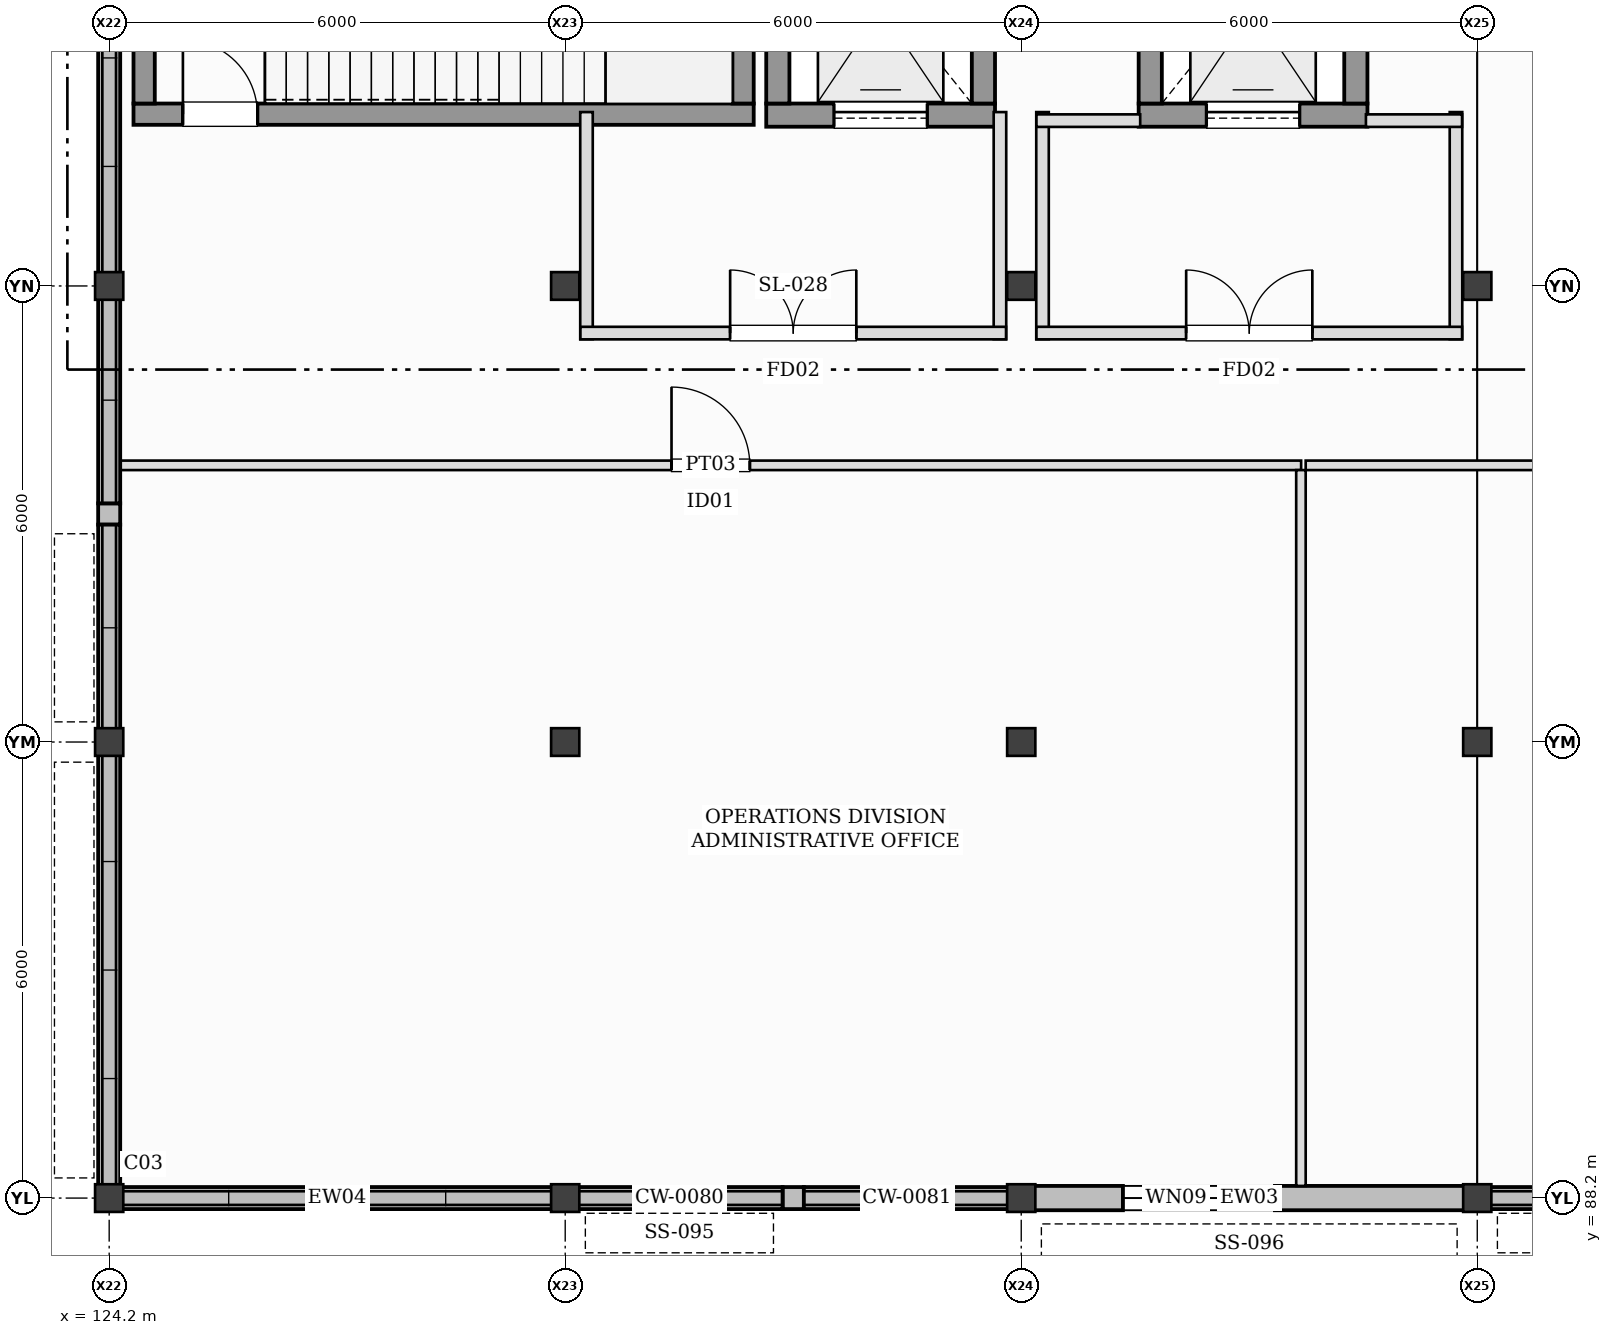
"""IFC4 building model, lengths in metres.
Left out: names, types, materials, properties, quantities, classifications, styles, units other than length and angle.
Written with IfcOpenShell. Run it as: python <this file> out.ifc"""

import sys

from ifc_helpers import new_model, si_unit, direction, frame, frame_2d, origin, origin_2d, place, context, subcontext, project, spatial, rectangle, i_section, extrude, element, fill, save


model = new_model("IFC4")
c1 = context("Model", 3, precision=1e-05, world=origin(), true_north=direction((0.0, 1.0)))
c2 = subcontext(c1, "Body", "Model", "MODEL_VIEW")
j1 = project(units=[si_unit("LENGTHUNIT", "METRE"), si_unit("PLANEANGLEUNIT", "RADIAN")], contexts=[c1])
p1 = place(None, origin())
s1 = spatial("IfcSite", under=j1, at=p1, CompositionType="ELEMENT")
p2 = place(p1, origin())
s2 = spatial("IfcBuilding", under=s1, at=p2, CompositionType="ELEMENT")
p3 = place(p2, frame((0.0, 0.0, 6.0)))
s3 = spatial("IfcBuildingStorey", under=s2, at=p3, CompositionType="ELEMENT", Elevation=6.0)
for number, where, z_axis, x_axis in (
    (1, (124.2, 88.2, 0.0), (0.0, 0.0, 1.0), (1.0, 0.0, 0.0)),
    (2, (124.2, 94.2, 0.0), (0.0, 0.0, 1.0), (1.0, 0.0, 0.0)),
    (3, (124.2, 100.2, 0.0), (0.0, 0.0, 1.0), (1.0, 0.0, 0.0)),
    (4, (130.2, 88.2, 0.0), (0.0, 0.0, 1.0), (1.0, 0.0, 0.0)),
    (5, (130.2, 94.2, 0.0), (0.0, 0.0, 1.0), (1.0, 0.0, 0.0)),
    (6, (130.2, 100.2, 0.0), (0.0, 0.0, 1.0), (1.0, 0.0, 0.0)),
    (7, (136.2, 88.2, 0.0), (0.0, 0.0, 1.0), (1.0, 0.0, 0.0)),
    (8, (136.2, 94.2, 0.0), (0.0, 0.0, 1.0), (1.0, 0.0, 0.0)),
    (9, (136.2, 100.2, 0.0), (0.0, 0.0, 1.0), (1.0, 0.0, 0.0)),
    (10, (142.2, 88.2, 0.0), (0.0, 0.0, 1.0), (1.0, 0.0, 0.0)),
    (11, (142.2, 94.2, 0.0), (0.0, 0.0, 1.0), (1.0, 0.0, 0.0)),
    (12, (142.2, 100.2, 0.0), (0.0, 0.0, 1.0), (1.0, 0.0, 0.0)),
):
    element("IfcColumn", number, at=place(p3, frame(where, z_axis=z_axis, x_axis=x_axis)), inside=s3, PredefinedType="COLUMN", context=c2, shape_type="SweptSolid", body=[
        extrude(i_section(OverallWidth=0.371, OverallDepth=0.364, WebThickness=0.013, FlangeThickness=0.022, at=origin_2d()), origin(), (0.0, 0.0, 1.0), 4.0),
    ])
p4 = place(p3, frame((124.345, 88.2, 0.0), z_axis=(0.0, 0.0, 1.0), x_axis=(1.0, 0.0, 0.0)))
e13 = element("IfcWall", 13, at=p4, inside=s3, PredefinedType="STANDARD", context=c2, shape_type="SweptSolid", body=[
    extrude(rectangle(XDim=5.71, YDim=0.29, at=frame_2d((2.855, 0.0))), origin(), (0.0, 0.0, 1.0), 0.68),
])
p5 = place(p3, frame((133.06, 88.2, 0.0), z_axis=(0.0, 0.0, 1.0), x_axis=(1.0, 0.0, 0.0)))
e14 = element("IfcWall", 14, at=p5, inside=s3, PredefinedType="STANDARD", context=c2, shape_type="SweptSolid", body=[
    extrude(rectangle(XDim=0.28, YDim=0.29, at=frame_2d((0.14, 0.0))), origin(), (0.0, 0.0, 1.0), 3.153),
])
p6 = place(p3, frame((130.345, 88.2, 0.0), z_axis=(0.0, 0.0, 1.0), x_axis=(1.0, 0.0, 0.0)))
e15 = element("IfcWall", 15, at=p6, inside=s3, PredefinedType="STANDARD", context=c2, shape_type="SweptSolid", body=[
    extrude(rectangle(XDim=2.715, YDim=0.29, at=frame_2d((1.357, 0.0))), origin(), (0.0, 0.0, 1.0), 0.8),
])
p7 = place(p3, frame((133.34, 88.2, 0.0), z_axis=(0.0, 0.0, 1.0), x_axis=(1.0, 0.0, 0.0)))
e16 = element("IfcWall", 16, at=p7, inside=s3, PredefinedType="STANDARD", context=c2, shape_type="SweptSolid", body=[
    extrude(rectangle(XDim=2.715, YDim=0.29, at=frame_2d((1.357, 0.0))), origin(), (0.0, 0.0, 1.0), 0.92),
])
p8 = place(p3, frame((136.345, 88.2, 0.0), z_axis=(0.0, 0.0, 1.0), x_axis=(1.0, 0.0, 0.0)))
e17 = element("IfcWall", 17, at=p8, inside=s3, PredefinedType="STANDARD", context=c2, shape_type="SweptSolid", body=[
    extrude(rectangle(XDim=5.71, YDim=0.32, at=frame_2d((2.855, 0.0))), origin(), (0.0, 0.0, 1.0), 3.153),
])
p9 = place(p8, frame((1.193, 0.0, 1.0)))
e18 = element("IfcOpeningElement", 18, at=p9, cuts=e17, PredefinedType="OPENING", context=c2, shape_type="SweptSolid", body=[
    extrude(rectangle(XDim=2.0, YDim=1.36, at=frame_2d((1.0, 0.68))), frame((0.0, 0.17, 0.0), z_axis=(0.0, -1.0, 0.0), x_axis=(1.0, 0.0, 0.0)), (0.0, 0.0, 1.0), 0.34),
])
p10 = place(p3, frame((142.345, 88.2, 0.0), z_axis=(0.0, 0.0, 1.0), x_axis=(1.0, 0.0, 0.0)))
e19 = element("IfcWall", 19, at=p10, inside=s3, PredefinedType="STANDARD", context=c2, shape_type="SweptSolid", body=[
    extrude(rectangle(XDim=2.715, YDim=0.29, at=frame_2d((1.357, 0.0))), origin(), (0.0, 0.0, 1.0), 0.32),
])
p11 = place(p3, frame((124.2, 94.055, 0.0), z_axis=(0.0, 0.0, 1.0), x_axis=(0.0, -1.0, 0.0)))
e20 = element("IfcWall", 20, at=p11, inside=s3, PredefinedType="STANDARD", context=c2, shape_type="SweptSolid", body=[
    extrude(rectangle(XDim=5.71, YDim=0.29, at=frame_2d((2.855, 0.0))), origin(), (0.0, 0.0, 1.0), 0.56),
])
p12 = place(p3, frame((124.2, 97.34, 0.0), z_axis=(0.0, 0.0, 1.0), x_axis=(0.0, -1.0, 0.0)))
e21 = element("IfcWall", 21, at=p12, inside=s3, PredefinedType="STANDARD", context=c2, shape_type="SweptSolid", body=[
    extrude(rectangle(XDim=0.28, YDim=0.29, at=frame_2d((0.14, 0.0))), origin(), (0.0, 0.0, 1.0), 3.157),
])
p13 = place(p3, frame((124.2, 100.055, 0.0), z_axis=(0.0, 0.0, 1.0), x_axis=(0.0, -1.0, 0.0)))
e22 = element("IfcWall", 22, at=p13, inside=s3, PredefinedType="STANDARD", context=c2, shape_type="SweptSolid", body=[
    extrude(rectangle(XDim=2.715, YDim=0.29, at=frame_2d((1.357, 0.0))), origin(), (0.0, 0.0, 1.0), 0.68),
])
p14 = place(p3, frame((124.2, 97.06, 0.0), z_axis=(0.0, 0.0, 1.0), x_axis=(0.0, -1.0, 0.0)))
e23 = element("IfcWall", 23, at=p14, inside=s3, PredefinedType="STANDARD", context=c2, shape_type="SweptSolid", body=[
    extrude(rectangle(XDim=2.715, YDim=0.29, at=frame_2d((1.357, 0.0))), origin(), (0.0, 0.0, 1.0), 0.8),
])
p15 = place(p3, frame((124.2, 106.055, 0.0), z_axis=(0.0, 0.0, 1.0), x_axis=(0.0, -1.0, 0.0)))
e24 = element("IfcWall", 24, at=p15, inside=s3, PredefinedType="STANDARD", context=c2, shape_type="SweptSolid", body=[
    extrude(rectangle(XDim=5.71, YDim=0.29, at=frame_2d((2.855, 0.0))), origin(), (0.0, 0.0, 1.0), 0.92),
])
p16 = place(p3, frame((124.52, 102.46, 0.0), z_axis=(0.0, 0.0, 1.0), x_axis=(1.0, 0.0, 0.0)))
e25 = element("IfcWall", 25, at=p16, inside=s3, PredefinedType="SHEAR", context=c2, shape_type="SweptSolid", body=[
    extrude(rectangle(XDim=8.16, YDim=0.28, at=frame_2d((4.08, 0.0))), origin(), (0.0, 0.0, 1.0), 4.0),
])
p17 = place(p16, frame((0.65, 0.0, 0.0)))
e26 = element("IfcOpeningElement", 26, at=p17, cuts=e25, PredefinedType="OPENING", context=c2, shape_type="SweptSolid", body=[
    extrude(rectangle(XDim=0.98, YDim=2.15, at=frame_2d((0.49, 1.075))), frame((0.0, 0.15, 0.0), z_axis=(0.0, -1.0, 0.0), x_axis=(1.0, 0.0, 0.0)), (0.0, 0.0, 1.0), 0.3),
])
for number, where, z_axis, x_axis in (
    (27, (124.66, 105.6, 0.0), (0.0, 0.0, 1.0), (0.0, -1.0, 0.0)),
    (28, (132.54, 102.6, 0.0), (0.0, 0.0, 1.0), (0.0, 1.0, 0.0)),
):
    element("IfcWall", number, at=place(p3, frame(where, z_axis=z_axis, x_axis=x_axis)), inside=s3, PredefinedType="SHEAR", context=c2, shape_type="SweptSolid", body=[
        extrude(rectangle(XDim=3.0, YDim=0.28, at=frame_2d((1.5, 0.0))), origin(), (0.0, 0.0, 1.0), 4.0),
    ])
p18 = place(p3, frame((132.845, 102.448, 0.0), z_axis=(0.0, 0.0, 1.0), x_axis=(1.0, 0.0, 0.0)))
e29 = element("IfcWall", 29, at=p18, inside=s3, PredefinedType="SHEAR", context=c2, shape_type="SweptSolid", body=[
    extrude(rectangle(XDim=3.01, YDim=0.305, at=frame_2d((1.505, 0.0))), origin(), (0.0, 0.0, 1.0), 4.0),
])
p19 = place(p18, frame((0.895, 0.0, 0.0)))
e30 = element("IfcOpeningElement", 30, at=p19, cuts=e29, PredefinedType="OPENING", context=c2, shape_type="SweptSolid", body=[
    extrude(rectangle(XDim=1.22, YDim=2.22, at=frame_2d((0.61, 1.11))), frame((0.0, 0.162, 0.0), z_axis=(0.0, -1.0, 0.0), x_axis=(1.0, 0.0, 0.0)), (0.0, 0.0, 1.0), 0.325),
])
for number, where, z_axis, x_axis in (
    (31, (132.998, 105.6, 0.0), (0.0, 0.0, 1.0), (0.0, -1.0, 0.0)),
    (32, (135.702, 102.6, 0.0), (0.0, 0.0, 1.0), (0.0, 1.0, 0.0)),
):
    element("IfcWall", number, at=place(p3, frame(where, z_axis=z_axis, x_axis=x_axis)), inside=s3, PredefinedType="SHEAR", context=c2, shape_type="SweptSolid", body=[
        extrude(rectangle(XDim=3.0, YDim=0.305, at=frame_2d((1.5, 0.0))), origin(), (0.0, 0.0, 1.0), 4.0),
    ])
for number, where, z_axis, x_axis in (
    (33, (130.48, 99.5, 0.0), (0.0, 0.0, 1.0), (0.0, 1.0, 0.0)),
    (34, (135.92, 102.488, 0.0), (0.0, 0.0, 1.0), (0.0, -1.0, 0.0)),
):
    element("IfcWall", number, at=place(p3, frame(where, z_axis=z_axis, x_axis=x_axis)), inside=s3, PredefinedType="PARTITIONING", context=c2, shape_type="SweptSolid", body=[
        extrude(rectangle(XDim=2.988, YDim=0.165, at=frame_2d((1.494, 0.0))), origin(), (0.0, 0.0, 1.0), 3.157),
    ])
p20 = place(p3, frame((130.4, 99.58, 0.0), z_axis=(0.0, 0.0, 1.0), x_axis=(1.0, 0.0, 0.0)))
e35 = element("IfcWall", 35, at=p20, inside=s3, PredefinedType="PARTITIONING", context=c2, shape_type="SweptSolid", body=[
    extrude(rectangle(XDim=5.6, YDim=0.165, at=frame_2d((2.8, 0.0))), origin(), (0.0, 0.0, 1.0), 3.72),
])
p21 = place(p20, frame((1.97, 0.0, 0.0)))
e36 = element("IfcOpeningElement", 36, at=p21, cuts=e35, PredefinedType="OPENING", context=c2, shape_type="SweptSolid", body=[
    extrude(rectangle(XDim=1.66, YDim=2.2, at=frame_2d((0.83, 1.1))), frame((0.0, 0.093, 0.0), z_axis=(0.0, -1.0, 0.0), x_axis=(1.0, 0.0, 0.0)), (0.0, 0.0, 1.0), 0.185),
])
p22 = place(p3, frame((137.745, 102.448, 0.0), z_axis=(0.0, 0.0, 1.0), x_axis=(1.0, 0.0, 0.0)))
e37 = element("IfcWall", 37, at=p22, inside=s3, PredefinedType="SHEAR", context=c2, shape_type="SweptSolid", body=[
    extrude(rectangle(XDim=3.01, YDim=0.305, at=frame_2d((1.505, 0.0))), origin(), (0.0, 0.0, 1.0), 4.0),
])
p23 = place(p22, frame((0.895, 0.0, 0.0)))
e38 = element("IfcOpeningElement", 38, at=p23, cuts=e37, PredefinedType="OPENING", context=c2, shape_type="SweptSolid", body=[
    extrude(rectangle(XDim=1.22, YDim=2.22, at=frame_2d((0.61, 1.11))), frame((0.0, 0.162, 0.0), z_axis=(0.0, -1.0, 0.0), x_axis=(1.0, 0.0, 0.0)), (0.0, 0.0, 1.0), 0.325),
])
for number, where, z_axis, x_axis in (
    (39, (137.897, 105.6, 0.0), (0.0, 0.0, 1.0), (0.0, -1.0, 0.0)),
    (40, (140.603, 102.6, 0.0), (0.0, 0.0, 1.0), (0.0, 1.0, 0.0)),
):
    element("IfcWall", number, at=place(p3, frame(where, z_axis=z_axis, x_axis=x_axis)), inside=s3, PredefinedType="SHEAR", context=c2, shape_type="SweptSolid", body=[
        extrude(rectangle(XDim=3.0, YDim=0.305, at=frame_2d((1.5, 0.0))), origin(), (0.0, 0.0, 1.0), 4.0),
    ])
for number, where, z_axis, x_axis in (
    (41, (136.48, 99.5, 0.0), (0.0, 0.0, 1.0), (0.0, 1.0, 0.0)),
    (42, (141.92, 102.488, 0.0), (0.0, 0.0, 1.0), (0.0, -1.0, 0.0)),
):
    element("IfcWall", number, at=place(p3, frame(where, z_axis=z_axis, x_axis=x_axis)), inside=s3, PredefinedType="PARTITIONING", context=c2, shape_type="SweptSolid", body=[
        extrude(rectangle(XDim=2.988, YDim=0.165, at=frame_2d((1.494, 0.0))), origin(), (0.0, 0.0, 1.0), 3.157),
    ])
p24 = place(p3, frame((136.4, 102.375, 0.0), z_axis=(0.0, 0.0, 1.0), x_axis=(1.0, 0.0, 0.0)))
e43 = element("IfcWall", 43, at=p24, inside=s3, PredefinedType="PARTITIONING", context=c2, shape_type="SweptSolid", body=[
    extrude(rectangle(XDim=1.365, YDim=0.165, at=frame_2d((0.683, 0.0))), origin(), (0.0, 0.0, 1.0), 3.72),
])
p25 = place(p3, frame((140.735, 102.375, 0.0), z_axis=(0.0, 0.0, 1.0), x_axis=(1.0, 0.0, 0.0)))
e44 = element("IfcWall", 44, at=p25, inside=s3, PredefinedType="PARTITIONING", context=c2, shape_type="SweptSolid", body=[
    extrude(rectangle(XDim=1.265, YDim=0.165, at=frame_2d((0.632, 0.0))), origin(), (0.0, 0.0, 1.0), 3.72),
])
p26 = place(p3, frame((136.4, 99.58, 0.0), z_axis=(0.0, 0.0, 1.0), x_axis=(1.0, 0.0, 0.0)))
e45 = element("IfcWall", 45, at=p26, inside=s3, PredefinedType="PARTITIONING", context=c2, shape_type="SweptSolid", body=[
    extrude(rectangle(XDim=5.6, YDim=0.165, at=frame_2d((2.8, 0.0))), origin(), (0.0, 0.0, 1.0), 3.72),
])
p27 = place(p26, frame((1.97, 0.0, 0.0)))
e46 = element("IfcOpeningElement", 46, at=p27, cuts=e45, PredefinedType="OPENING", context=c2, shape_type="SweptSolid", body=[
    extrude(rectangle(XDim=1.66, YDim=2.2, at=frame_2d((0.83, 1.1))), frame((0.0, 0.093, 0.0), z_axis=(0.0, -1.0, 0.0), x_axis=(1.0, 0.0, 0.0)), (0.0, 0.0, 1.0), 0.185),
])
p28 = place(p3, frame((124.345, 97.84, 0.0), z_axis=(0.0, 0.0, 1.0), x_axis=(1.0, 0.0, 0.0)))
e47 = element("IfcWall", 47, at=p28, inside=s3, PredefinedType="PARTITIONING", context=c2, shape_type="SweptSolid", body=[
    extrude(rectangle(XDim=15.538, YDim=0.125, at=frame_2d((7.769, 0.0))), origin(), (0.0, 0.0, 1.0), 3.72),
])
p29 = place(p28, frame((7.254, 0.0, 0.0)))
e48 = element("IfcOpeningElement", 48, at=p29, cuts=e47, PredefinedType="OPENING", context=c2, shape_type="SweptSolid", body=[
    extrude(rectangle(XDim=1.03, YDim=2.15, at=frame_2d((0.515, 1.075))), frame((0.0, 0.073, 0.0), z_axis=(0.0, -1.0, 0.0), x_axis=(1.0, 0.0, 0.0)), (0.0, 0.0, 1.0), 0.145),
])
p30 = place(p3, frame((139.88, 97.778, 0.0), z_axis=(0.0, 0.0, 1.0), x_axis=(0.0, -1.0, 0.0)))
e49 = element("IfcWall", 49, at=p30, inside=s3, PredefinedType="PARTITIONING", context=c2, shape_type="SweptSolid", body=[
    extrude(rectangle(XDim=9.417, YDim=0.125, at=frame_2d((4.709, 0.0))), origin(), (0.0, 0.0, 1.0), 3.289),
])
p31 = place(p3, frame((139.942, 97.84, 0.0), z_axis=(0.0, 0.0, 1.0), x_axis=(1.0, 0.0, 0.0)))
e50 = element("IfcWall", 50, at=p31, inside=s3, PredefinedType="PARTITIONING", context=c2, shape_type="SweptSolid", body=[
    extrude(rectangle(XDim=14.09, YDim=0.125, at=frame_2d((7.045, 0.0))), origin(), (0.0, 0.0, 1.0), 3.72),
])
p32 = place(p31, frame((6.565, 0.0, 0.0)))
e51 = element("IfcOpeningElement", 51, at=p32, cuts=e50, PredefinedType="OPENING", context=c2, shape_type="SweptSolid", body=[
    extrude(rectangle(XDim=0.96, YDim=2.15, at=frame_2d((0.48, 1.075))), frame((0.0, 0.073, 0.0), z_axis=(0.0, -1.0, 0.0), x_axis=(1.0, 0.0, 0.0)), (0.0, 0.0, 1.0), 0.145),
])
p33 = place(p9, origin())
e52 = element("IfcWindow", 52, at=p33, inside=s3, PartitioningType="SINGLE_PANEL", PredefinedType="WINDOW", context=c2, shape_type="SweptSolid", body=[
    extrude(rectangle(XDim=2.0, YDim=1.36, at=frame_2d((1.0, 0.68))), frame((0.0, 0.03, 0.0), z_axis=(0.0, -1.0, 0.0), x_axis=(1.0, 0.0, 0.0)), (0.0, 0.0, 1.0), 0.06),
])
fill(e18, e52)
p34 = place(p17, origin())
e53 = element("IfcDoor", 53, at=p34, inside=s3, OperationType="SINGLE_SWING_LEFT", PredefinedType="DOOR", context=c2, shape_type="SweptSolid", body=[
    extrude(rectangle(XDim=0.98, YDim=2.15, at=frame_2d((0.49, 1.075))), frame((0.0, 0.025, 0.0), z_axis=(0.0, -1.0, 0.0), x_axis=(1.0, 0.0, 0.0)), (0.0, 0.0, 1.0), 0.05),
])
fill(e26, e53)
p35 = place(p19, origin())
e54 = element("IfcDoor", 54, at=p35, inside=s3, OperationType="SLIDING_TO_LEFT", PredefinedType="DOOR", context=c2, shape_type="SweptSolid", body=[
    extrude(rectangle(XDim=1.22, YDim=2.22, at=frame_2d((0.61, 1.11))), frame((0.0, 0.025, 0.0), z_axis=(0.0, -1.0, 0.0), x_axis=(1.0, 0.0, 0.0)), (0.0, 0.0, 1.0), 0.05),
])
fill(e30, e54)
p36 = place(p21, frame((1.66, 0.0, 0.0), z_axis=(0.0, 0.0, 1.0), x_axis=(-1.0, 0.0, 0.0)))
e55 = element("IfcDoor", 55, at=p36, inside=s3, OperationType="DOUBLE_DOOR_SINGLE_SWING", PredefinedType="DOOR", context=c2, shape_type="SweptSolid", body=[
    extrude(rectangle(XDim=1.66, YDim=2.2, at=frame_2d((0.83, 1.1))), frame((0.0, 0.025, 0.0), z_axis=(0.0, -1.0, 0.0), x_axis=(1.0, 0.0, 0.0)), (0.0, 0.0, 1.0), 0.05),
])
fill(e36, e55)
p37 = place(p23, origin())
e56 = element("IfcDoor", 56, at=p37, inside=s3, OperationType="SLIDING_TO_LEFT", PredefinedType="DOOR", context=c2, shape_type="SweptSolid", body=[
    extrude(rectangle(XDim=1.22, YDim=2.22, at=frame_2d((0.61, 1.11))), frame((0.0, 0.025, 0.0), z_axis=(0.0, -1.0, 0.0), x_axis=(1.0, 0.0, 0.0)), (0.0, 0.0, 1.0), 0.05),
])
fill(e38, e56)
p38 = place(p27, frame((1.66, 0.0, 0.0), z_axis=(0.0, 0.0, 1.0), x_axis=(-1.0, 0.0, 0.0)))
e57 = element("IfcDoor", 57, at=p38, inside=s3, OperationType="DOUBLE_DOOR_SINGLE_SWING", PredefinedType="DOOR", context=c2, shape_type="SweptSolid", body=[
    extrude(rectangle(XDim=1.66, YDim=2.2, at=frame_2d((0.83, 1.1))), frame((0.0, 0.025, 0.0), z_axis=(0.0, -1.0, 0.0), x_axis=(1.0, 0.0, 0.0)), (0.0, 0.0, 1.0), 0.05),
])
fill(e46, e57)
p39 = place(p29, frame((1.03, 0.0, 0.0), z_axis=(0.0, 0.0, 1.0), x_axis=(-1.0, 0.0, 0.0)))
e58 = element("IfcDoor", 58, at=p39, inside=s3, OperationType="SINGLE_SWING_LEFT", PredefinedType="DOOR", context=c2, shape_type="SweptSolid", body=[
    extrude(rectangle(XDim=1.03, YDim=2.15, at=frame_2d((0.515, 1.075))), frame((0.0, 0.025, 0.0), z_axis=(0.0, -1.0, 0.0), x_axis=(1.0, 0.0, 0.0)), (0.0, 0.0, 1.0), 0.05),
])
fill(e48, e58)
save(model, sys.argv[1])
